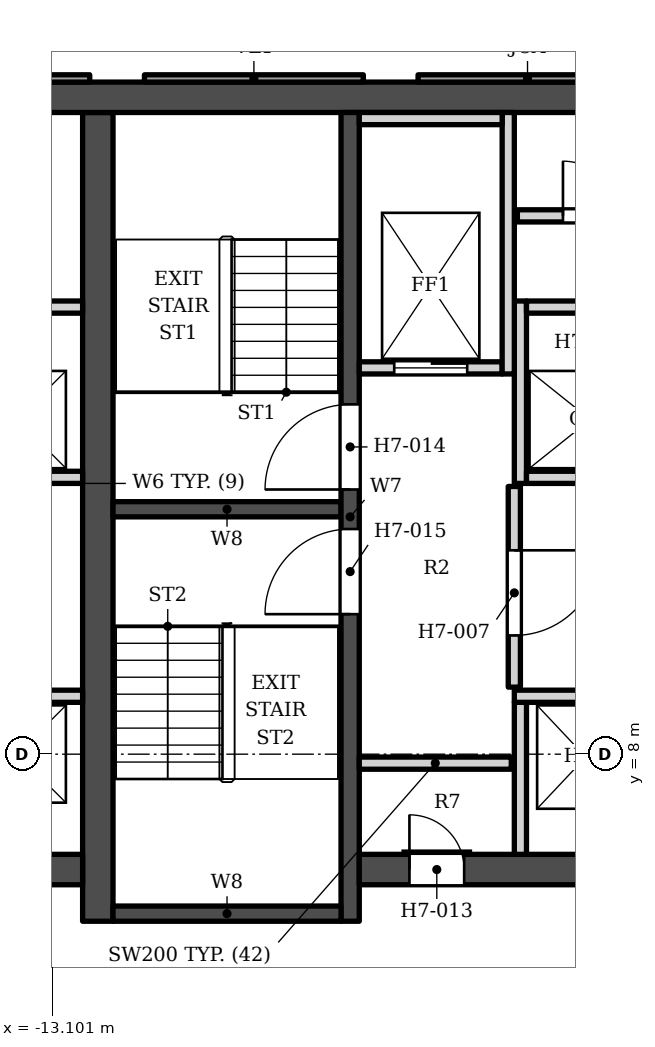
"""IFC4 building model, lengths in metres.
Left out: names, types, materials, properties, quantities, classifications, styles, units other than length and angle.
Written with IfcOpenShell. Run it as: python <this file> out.ifc"""

import sys

from ifc_helpers import new_model, si_unit, direction, frame, frame_2d, origin, place, context, subcontext, project, spatial, polyline, rectangle, outline, extrude, element, fill, save


model = new_model("IFC4")
c1 = context("Model", 3, precision=1e-05, world=origin(), true_north=direction((0.0, 1.0)))
c2 = subcontext(c1, "Body", "Model", "MODEL_VIEW")
j1 = project(units=[si_unit("LENGTHUNIT", "METRE"), si_unit("PLANEANGLEUNIT", "RADIAN")], contexts=[c1])
p1 = place(None, origin())
s1 = spatial("IfcSite", under=j1, at=p1, CompositionType="ELEMENT")
p2 = place(p1, origin())
s2 = spatial("IfcBuilding", under=s1, at=p2, CompositionType="ELEMENT")
p3 = place(p2, frame((0.0, 0.0, 112.2)))
s3 = spatial("IfcBuildingStorey", under=s2, at=p3, CompositionType="ELEMENT", Elevation=112.2)
p4 = place(p3, frame((-16.9, 18.802, 0.0), z_axis=(0.0, 0.0, 1.0), x_axis=(1.0, 0.0, 0.0)))
e1 = element("IfcWall", 1, at=p4, inside=s3, PredefinedType="SHEAR", context=c2, shape_type="SweptSolid", body=[
    extrude(rectangle(XDim=33.8, YDim=0.5, at=frame_2d((16.9, 0.0))), origin(), (0.0, 0.0, 1.0), 3.4),
])
p5 = place(p3, frame((-12.35, 5.253, 0.0), z_axis=(0.0, 0.0, 1.0), x_axis=(0.0, 1.0, 0.0)))
e2 = element("IfcWall", 2, at=p5, inside=s3, PredefinedType="SHEAR", context=c2, shape_type="SweptSolid", body=[
    extrude(rectangle(XDim=13.3, YDim=0.5, at=frame_2d((6.65, 0.0))), origin(), (0.0, 0.0, 1.0), 3.4),
])
p6 = place(p3, frame((-8.2, 5.253, 0.0), z_axis=(0.0, 0.0, 1.0), x_axis=(0.0, 1.0, 0.0)))
e3 = element("IfcWall", 3, at=p6, inside=s3, PredefinedType="SHEAR", context=c2, shape_type="SweptSolid", body=[
    extrude(rectangle(XDim=13.3, YDim=0.3, at=frame_2d((6.65, 0.0))), origin(), (0.0, 0.0, 1.0), 3.4),
])
p7 = place(p6, frame((7.1, 0.0, 0.0)))
e4 = element("IfcOpeningElement", 4, at=p7, cuts=e3, PredefinedType="OPENING", context=c2, shape_type="SweptSolid", body=[
    extrude(rectangle(XDim=1.4, YDim=2.1, at=frame_2d((0.7, 1.05))), frame((0.0, 0.16, 0.0), z_axis=(0.0, -1.0, 0.0), x_axis=(1.0, 0.0, 0.0)), (0.0, 0.0, 1.0), 0.32),
])
p8 = place(p6, frame((5.05, 0.0, 0.0)))
e5 = element("IfcOpeningElement", 5, at=p8, cuts=e3, PredefinedType="OPENING", context=c2, shape_type="SweptSolid", body=[
    extrude(rectangle(XDim=1.4, YDim=2.1, at=frame_2d((0.7, 1.05))), frame((0.0, 0.16, 0.0), z_axis=(0.0, -1.0, 0.0), x_axis=(1.0, 0.0, 0.0)), (0.0, 0.0, 1.0), 0.32),
])
for number, where, z_axis, x_axis in (
    (6, (-12.1, 12.028, 0.0), (0.0, 0.0, 1.0), (1.0, 0.0, 0.0)),
    (7, (-12.1, 5.378, 0.0), (0.0, 0.0, 1.0), (1.0, 0.0, 0.0)),
):
    element("IfcWall", number, at=place(p3, frame(where, z_axis=z_axis, x_axis=x_axis)), inside=s3, PredefinedType="SHEAR", context=c2, shape_type="SweptSolid", body=[
        extrude(rectangle(XDim=3.75, YDim=0.25, at=frame_2d((1.875, 0.0))), origin(), (0.0, 0.0, 1.0), 3.4),
    ])
p9 = place(p3, frame((-8.05, 6.103, 0.0), z_axis=(0.0, 0.0, 1.0), x_axis=(1.0, 0.0, 0.0)))
e8 = element("IfcWall", 8, at=p9, inside=s3, PredefinedType="SHEAR", context=c2, shape_type="SweptSolid", body=[
    extrude(rectangle(XDim=7.05, YDim=0.5, at=frame_2d((3.525, 0.0))), origin(), (0.0, 0.0, 1.0), 3.4),
])
p10 = place(p9, frame((0.825, 0.0, 0.0)))
e9 = element("IfcOpeningElement", 9, at=p10, cuts=e8, PredefinedType="OPENING", context=c2, shape_type="SweptSolid", body=[
    extrude(rectangle(XDim=0.9, YDim=2.1, at=frame_2d((0.45, 1.05))), frame((0.0, 0.26, 0.0), z_axis=(0.0, -1.0, 0.0), x_axis=(1.0, 0.0, 0.0)), (0.0, 0.0, 1.0), 0.52),
])
p11 = place(p3, frame((-12.6, 6.103, 0.0), z_axis=(0.0, 0.0, 1.0), x_axis=(-1.0, 0.0, 0.0)))
e10 = element("IfcWall", 10, at=p11, inside=s3, PredefinedType="SHEAR", context=c2, shape_type="SweptSolid", body=[
    extrude(rectangle(XDim=4.3, YDim=0.5, at=frame_2d((2.15, 0.0))), origin(), (0.0, 0.0, 1.0), 3.4),
])
p12 = place(p3, origin())
e11 = element("IfcWall", 11, at=p12, inside=s3, PredefinedType="SOLIDWALL", context=c2, shape_type="SweptSolid", body=[
    extrude(outline(polyline([(-7.083, 19.173), (-7.083, 19.052), (-3.483, 19.052), (-3.483, 19.173), (-7.083, 19.173)])), origin(), (0.0, 0.0, 1.0), 2.65),
])
p13 = place(p3, origin())
e12 = element("IfcWall", 12, at=p13, inside=s3, PredefinedType="ELEMENTEDWALL", context=c2, shape_type="SweptSolid", body=[
    extrude(outline(polyline([(-11.583, 19.173), (-11.583, 19.052), (-7.983, 19.052), (-7.983, 19.173), (-11.583, 19.173)])), origin(), (0.0, 0.0, 1.0), 2.65),
])
p14 = place(p3, origin())
e13 = element("IfcWall", 13, at=p14, inside=s3, PredefinedType="SOLIDWALL", context=c2, shape_type="SweptSolid", body=[
    extrude(outline(polyline([(-16.083, 19.173), (-16.083, 19.052), (-12.483, 19.052), (-12.483, 19.173), (-16.083, 19.173)])), origin(), (0.0, 0.0, 1.0), 2.65),
])
for number, where, z_axis, x_axis in (
    (14, (-5.4, 6.353, 0.0), (0.0, 0.0, 1.0), (0.0, 1.0, 0.0)),
    (15, (-8.05, 7.853, 0.0), (0.0, 0.0, 1.0), (1.0, 0.0, 0.0)),
):
    element("IfcWall", number, at=place(p3, frame(where, z_axis=z_axis, x_axis=x_axis)), inside=s3, PredefinedType="SOLIDWALL", context=c2, shape_type="SweptSolid", body=[
        extrude(rectangle(XDim=2.5, YDim=0.2, at=frame_2d((1.25, 0.0))), origin(), (0.0, 0.0, 1.0), 3.23),
    ])
p15 = place(p3, frame((-16.9, 8.953, 0.0), z_axis=(0.0, 0.0, 1.0), x_axis=(1.0, 0.0, 0.0)))
e16 = element("IfcWall", 16, at=p15, inside=s3, PredefinedType="SOLIDWALL", context=c2, shape_type="SweptSolid", body=[
    extrude(rectangle(XDim=4.3, YDim=0.2, at=frame_2d((2.15, 0.0))), origin(), (0.0, 0.0, 1.0), 3.23),
])
p16 = place(p15, frame((2.675, 0.0, 0.0)))
e17 = element("IfcOpeningElement", 17, at=p16, cuts=e16, PredefinedType="OPENING", context=c2, shape_type="SweptSolid", body=[
    extrude(rectangle(XDim=1.1, YDim=2.1, at=frame_2d((0.55, 1.05))), frame((0.0, 0.11, 0.0), z_axis=(0.0, -1.0, 0.0), x_axis=(1.0, 0.0, 0.0)), (0.0, 0.0, 1.0), 0.22),
])
p17 = place(p15, frame((0.425, 0.0, 0.0)))
e18 = element("IfcOpeningElement", 18, at=p17, cuts=e16, PredefinedType="OPENING", context=c2, shape_type="SweptSolid", body=[
    extrude(rectangle(XDim=1.1, YDim=2.1, at=frame_2d((0.55, 1.05))), frame((0.0, 0.11, 0.0), z_axis=(0.0, -1.0, 0.0), x_axis=(1.0, 0.0, 0.0)), (0.0, 0.0, 1.0), 0.22),
])
p18 = place(p3, frame((-5.5, 8.953, 0.0), z_axis=(0.0, 0.0, 1.0), x_axis=(1.0, 0.0, 0.0)))
e19 = element("IfcWall", 19, at=p18, inside=s3, PredefinedType="SOLIDWALL", context=c2, shape_type="SweptSolid", body=[
    extrude(rectangle(XDim=4.5, YDim=0.2, at=frame_2d((2.25, 0.0))), origin(), (0.0, 0.0, 1.0), 3.23),
])
p19 = place(p3, frame((-5.5, 9.103, 0.0), z_axis=(0.0, 0.0, 1.0), x_axis=(0.0, 1.0, 0.0)))
e20 = element("IfcWall", 20, at=p19, inside=s3, PredefinedType="SOLIDWALL", context=c2, shape_type="SweptSolid", body=[
    extrude(rectangle(XDim=3.3, YDim=0.2, at=frame_2d((1.65, 0.0))), origin(), (0.0, 0.0, 1.0), 3.23),
])
p20 = place(p19, frame((0.85, 0.0, 0.0)))
e21 = element("IfcOpeningElement", 21, at=p20, cuts=e20, PredefinedType="OPENING", context=c2, shape_type="SweptSolid", body=[
    extrude(rectangle(XDim=1.4, YDim=2.1, at=frame_2d((0.7, 1.05))), frame((0.0, 0.11, 0.0), z_axis=(0.0, -1.0, 0.0), x_axis=(1.0, 0.0, 0.0)), (0.0, 0.0, 1.0), 0.22),
])
p21 = place(p3, frame((-16.9, 12.552, 0.0), z_axis=(0.0, 0.0, 1.0), x_axis=(1.0, 0.0, 0.0)))
e22 = element("IfcWall", 22, at=p21, inside=s3, PredefinedType="SOLIDWALL", context=c2, shape_type="SweptSolid", body=[
    extrude(rectangle(XDim=4.3, YDim=0.2, at=frame_2d((2.15, 0.0))), origin(), (0.0, 0.0, 1.0), 3.23),
])
p22 = place(p21, frame((2.675, 0.0, 0.0)))
e23 = element("IfcOpeningElement", 23, at=p22, cuts=e22, PredefinedType="OPENING", context=c2, shape_type="SweptSolid", body=[
    extrude(rectangle(XDim=1.1, YDim=2.1, at=frame_2d((0.55, 1.05))), frame((0.0, 0.11, 0.0), z_axis=(0.0, -1.0, 0.0), x_axis=(1.0, 0.0, 0.0)), (0.0, 0.0, 1.0), 0.22),
])
p23 = place(p21, frame((0.425, 0.0, 0.0)))
e24 = element("IfcOpeningElement", 24, at=p23, cuts=e22, PredefinedType="OPENING", context=c2, shape_type="SweptSolid", body=[
    extrude(rectangle(XDim=1.1, YDim=2.1, at=frame_2d((0.55, 1.05))), frame((0.0, 0.11, 0.0), z_axis=(0.0, -1.0, 0.0), x_axis=(1.0, 0.0, 0.0)), (0.0, 0.0, 1.0), 0.22),
])
p24 = place(p3, frame((-5.4, 12.453, 0.0), z_axis=(0.0, 0.0, 1.0), x_axis=(0.0, 1.0, 0.0)))
e25 = element("IfcWall", 25, at=p24, inside=s3, PredefinedType="SOLIDWALL", context=c2, shape_type="SweptSolid", body=[
    extrude(rectangle(XDim=3.0, YDim=0.2, at=frame_2d((1.5, 0.0))), origin(), (0.0, 0.0, 1.0), 3.23),
])
p25 = place(p3, frame((-5.3, 12.552, 0.0), z_axis=(0.0, 0.0, 1.0), x_axis=(1.0, 0.0, 0.0)))
e26 = element("IfcWall", 26, at=p25, inside=s3, PredefinedType="SOLIDWALL", context=c2, shape_type="SweptSolid", body=[
    extrude(rectangle(XDim=2.1, YDim=0.2, at=frame_2d((1.05, 0.0))), origin(), (0.0, 0.0, 1.0), 3.23),
])
p26 = place(p3, frame((-8.05, 14.353, 0.0), z_axis=(0.0, 0.0, 1.0), x_axis=(1.0, 0.0, 0.0)))
e27 = element("IfcWall", 27, at=p26, inside=s3, PredefinedType="SOLIDWALL", context=c2, shape_type="SweptSolid", body=[
    extrude(rectangle(XDim=2.35, YDim=0.2, at=frame_2d((1.175, 0.0))), origin(), (0.0, 0.0, 1.0), 3.23),
])
p27 = place(p26, frame((0.575, 0.0, 0.0)))
e28 = element("IfcOpeningElement", 28, at=p27, cuts=e27, PredefinedType="OPENING", context=c2, shape_type="SweptSolid", body=[
    extrude(rectangle(XDim=1.2, YDim=2.1, at=frame_2d((0.6, 1.05))), frame((0.0, 0.11, 0.0), z_axis=(0.0, -1.0, 0.0), x_axis=(1.0, 0.0, 0.0)), (0.0, 0.0, 1.0), 0.22),
])
for number, where, z_axis, x_axis in (
    (29, (-5.6, 14.253, 0.0), (0.0, 0.0, 1.0), (0.0, 1.0, 0.0)),
    (30, (-16.9, 15.353, 0.0), (0.0, 0.0, 1.0), (1.0, 0.0, 0.0)),
):
    element("IfcWall", number, at=place(p3, frame(where, z_axis=z_axis, x_axis=x_axis)), inside=s3, PredefinedType="SOLIDWALL", context=c2, shape_type="SweptSolid", body=[
        extrude(rectangle(XDim=4.3, YDim=0.2, at=frame_2d((2.15, 0.0))), origin(), (0.0, 0.0, 1.0), 3.23),
    ])
p28 = place(p3, frame((-5.3, 15.353, 0.0), z_axis=(0.0, 0.0, 1.0), x_axis=(1.0, 0.0, 0.0)))
e31 = element("IfcWall", 31, at=p28, inside=s3, PredefinedType="SOLIDWALL", context=c2, shape_type="SweptSolid", body=[
    extrude(rectangle(XDim=2.1, YDim=0.2, at=frame_2d((1.05, 0.0))), origin(), (0.0, 0.0, 1.0), 3.23),
])
p29 = place(p3, frame((-5.45, 16.853, 0.0), z_axis=(0.0, 0.0, 1.0), x_axis=(1.0, 0.0, 0.0)))
e32 = element("IfcWall", 32, at=p29, inside=s3, PredefinedType="SOLIDWALL", context=c2, shape_type="SweptSolid", body=[
    extrude(rectangle(XDim=2.55, YDim=0.2, at=frame_2d((1.275, 0.0))), origin(), (0.0, 0.0, 1.0), 3.23),
])
p30 = place(p29, frame((0.75, 0.0, 0.0)))
e33 = element("IfcOpeningElement", 33, at=p30, cuts=e32, PredefinedType="OPENING", context=c2, shape_type="SweptSolid", body=[
    extrude(rectangle(XDim=0.9, YDim=2.1, at=frame_2d((0.45, 1.05))), frame((0.0, 0.11, 0.0), z_axis=(0.0, -1.0, 0.0), x_axis=(1.0, 0.0, 0.0)), (0.0, 0.0, 1.0), 0.22),
])
p31 = place(p3, frame((-8.05, 18.453, 0.0), z_axis=(0.0, 0.0, 1.0), x_axis=(1.0, 0.0, 0.0)))
e34 = element("IfcWall", 34, at=p31, inside=s3, PredefinedType="SOLIDWALL", context=c2, shape_type="SweptSolid", body=[
    extrude(rectangle(XDim=2.35, YDim=0.2, at=frame_2d((1.175, 0.0))), origin(), (0.0, 0.0, 1.0), 3.23),
])
p32 = place(p3, frame((-5.905, 3.731, 0.0), z_axis=(0.0, 0.0, 1.0), x_axis=(0.948683298051, 0.316227766017, 0.0)))
e35 = element("IfcWall", 35, at=p32, inside=s3, PredefinedType="PARTITIONING", context=c2, shape_type="SweptSolid", body=[
    extrude(rectangle(XDim=2.28, YDim=0.2, at=frame_2d((1.14, 0.0))), origin(), (0.0, 0.0, 1.0), 2.384),
])
p33 = place(p27, origin())
e36 = element("IfcDoor", 36, at=p33, inside=s3, OperationType="DOUBLE_DOOR_SLIDING", PredefinedType="DOOR", context=c2, shape_type="SweptSolid", body=[
    extrude(rectangle(XDim=1.2, YDim=2.1, at=frame_2d((0.6, 1.05))), frame((0.0, 0.025, 0.0), z_axis=(0.0, -1.0, 0.0), x_axis=(1.0, 0.0, 0.0)), (0.0, 0.0, 1.0), 0.05),
])
fill(e28, e36)
p34 = place(p7, origin())
e37 = element("IfcDoor", 37, at=p34, inside=s3, OperationType="SINGLE_SWING_LEFT", PredefinedType="DOOR", context=c2, shape_type="SweptSolid", body=[
    extrude(rectangle(XDim=1.4, YDim=2.1, at=frame_2d((0.7, 1.05))), frame((0.0, 0.025, 0.0), z_axis=(0.0, -1.0, 0.0), x_axis=(1.0, 0.0, 0.0)), (0.0, 0.0, 1.0), 0.05),
])
fill(e4, e37)
p35 = place(p8, origin())
e38 = element("IfcDoor", 38, at=p35, inside=s3, OperationType="SINGLE_SWING_LEFT", PredefinedType="DOOR", context=c2, shape_type="SweptSolid", body=[
    extrude(rectangle(XDim=1.4, YDim=2.1, at=frame_2d((0.7, 1.05))), frame((0.0, 0.025, 0.0), z_axis=(0.0, -1.0, 0.0), x_axis=(1.0, 0.0, 0.0)), (0.0, 0.0, 1.0), 0.05),
])
fill(e5, e38)
p36 = place(p20, origin())
e39 = element("IfcDoor", 39, at=p36, inside=s3, OperationType="SINGLE_SWING_RIGHT", PredefinedType="DOOR", context=c2, shape_type="SweptSolid", body=[
    extrude(rectangle(XDim=1.4, YDim=2.1, at=frame_2d((0.7, 1.05))), frame((0.0, 0.025, 0.0), z_axis=(0.0, -1.0, 0.0), x_axis=(1.0, 0.0, 0.0)), (0.0, 0.0, 1.0), 0.05),
])
fill(e21, e39)
p37 = place(p30, origin())
e40 = element("IfcDoor", 40, at=p37, inside=s3, OperationType="SINGLE_SWING_LEFT", PredefinedType="DOOR", context=c2, shape_type="SweptSolid", body=[
    extrude(rectangle(XDim=0.9, YDim=2.1, at=frame_2d((0.45, 1.05))), frame((0.0, 0.025, 0.0), z_axis=(0.0, -1.0, 0.0), x_axis=(1.0, 0.0, 0.0)), (0.0, 0.0, 1.0), 0.05),
])
fill(e33, e40)
p38 = place(p10, origin())
e41 = element("IfcDoor", 41, at=p38, inside=s3, OperationType="SINGLE_SWING_LEFT", PredefinedType="DOOR", context=c2, shape_type="SweptSolid", body=[
    extrude(rectangle(XDim=0.9, YDim=2.1, at=frame_2d((0.45, 1.05))), frame((0.0, 0.025, 0.0), z_axis=(0.0, -1.0, 0.0), x_axis=(1.0, 0.0, 0.0)), (0.0, 0.0, 1.0), 0.05),
])
fill(e9, e41)
save(model, sys.argv[1])
